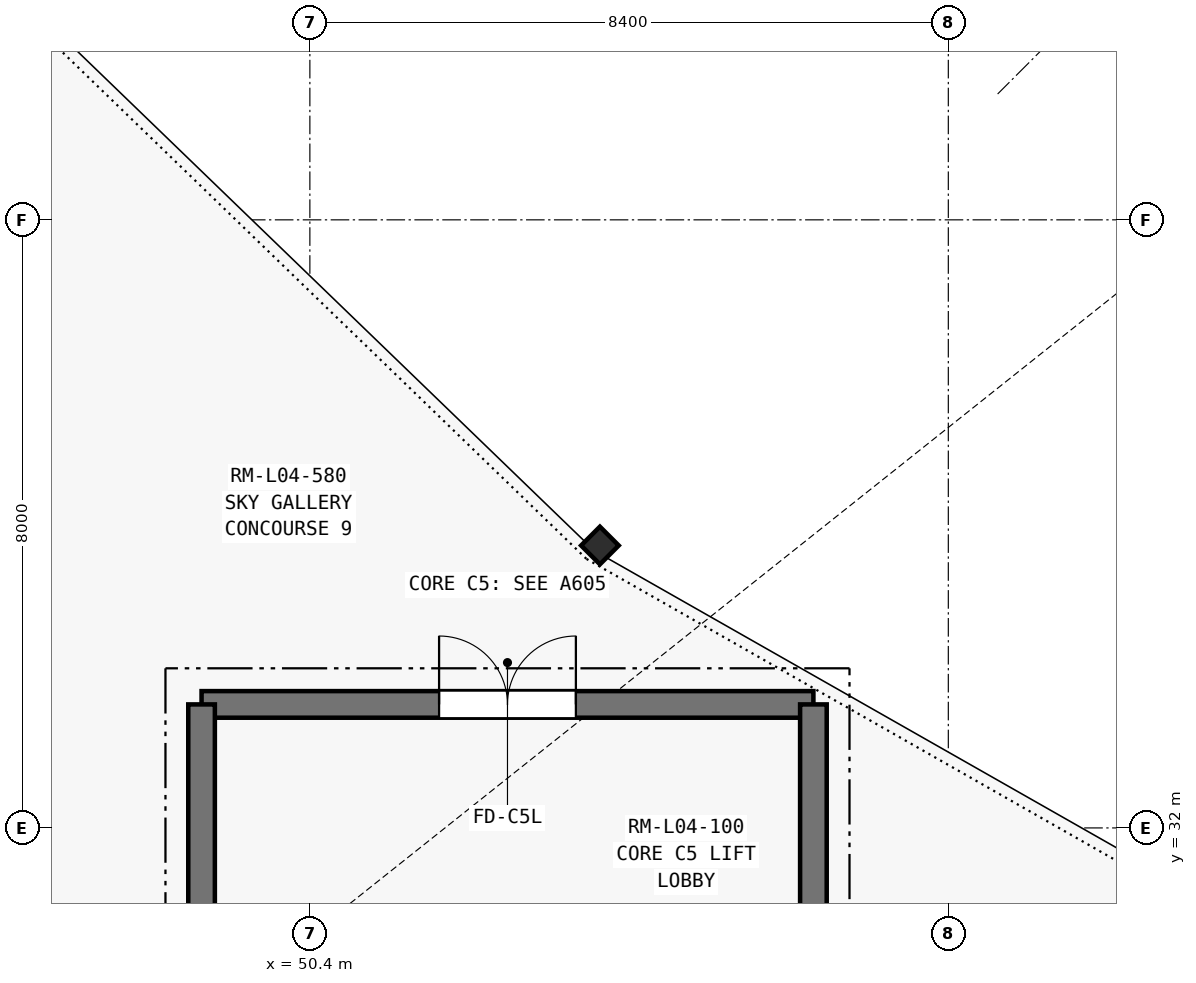
"""IFC4 building model, lengths in metres.
Left out: names, types, materials, properties, quantities, classifications, styles, units other than length and angle.
Written with IfcOpenShell. Run it as: python <this file> out.ifc"""

import sys

from ifc_helpers import new_model, si_unit, direction, frame, frame_2d, origin, origin_2d, place, context, subcontext, project, spatial, rectangle, i_section, extrude, element, fill, save


model = new_model("IFC4")
c1 = context("Model", 3, precision=1e-05, world=origin(), true_north=direction((0.0, 1.0)))
c2 = subcontext(c1, "Body", "Model", "MODEL_VIEW")
j1 = project(units=[si_unit("LENGTHUNIT", "METRE"), si_unit("PLANEANGLEUNIT", "RADIAN")], contexts=[c1])
p1 = place(None, origin())
s1 = spatial("IfcSite", under=j1, at=p1, CompositionType="ELEMENT")
p2 = place(p1, origin())
s2 = spatial("IfcBuilding", under=s1, at=p2, CompositionType="ELEMENT")
p3 = place(p2, frame((0.0, 0.0, 18.9)))
s3 = spatial("IfcBuildingStorey", under=s2, at=p3, CompositionType="ELEMENT", Elevation=18.9)
p4 = place(p3, frame((54.216, 35.716, 0.0), z_axis=(0.0, 0.0, 1.0), x_axis=(-0.707106781187, -0.707106781187, 0.0)))
e1 = element("IfcColumn", 1, at=p4, inside=s3, PredefinedType="COLUMN", context=c2, shape_type="SweptSolid", body=[
    extrude(i_section(OverallWidth=0.35, OverallDepth=0.35, WebThickness=0.014, FlangeThickness=0.024, at=origin_2d()), origin(), (0.0, 0.0, 1.0), 4.5),
])
p5 = place(p3, frame((48.975, 33.625, 0.0), z_axis=(0.0, 0.0, 1.0), x_axis=(1.0, 0.0, 0.0)))
e2 = element("IfcWall", 2, at=p5, inside=s3, PredefinedType="SHEAR", context=c2, shape_type="SweptSolid", body=[
    extrude(rectangle(XDim=8.05, YDim=0.35, at=frame_2d((4.025, 0.0))), origin(), (0.0, 0.0, 1.0), 4.5),
])
p6 = place(p5, frame((3.125, 0.0, 0.0)))
e3 = element("IfcOpeningElement", 3, at=p6, cuts=e2, PredefinedType="OPENING", context=c2, shape_type="SweptSolid", body=[
    extrude(rectangle(XDim=1.8, YDim=2.25, at=frame_2d((0.9, 1.125))), frame((0.0, 0.185, 0.0), z_axis=(0.0, -1.0, 0.0), x_axis=(1.0, 0.0, 0.0)), (0.0, 0.0, 1.0), 0.37),
])
p7 = place(p3, frame((48.975, 18.775, 0.0), z_axis=(0.0, 0.0, 1.0), x_axis=(0.0, 1.0, 0.0)))
e4 = element("IfcWall", 4, at=p7, inside=s3, PredefinedType="SHEAR", context=c2, shape_type="SweptSolid", body=[
    extrude(rectangle(XDim=14.85, YDim=0.35, at=frame_2d((7.425, 0.0))), origin(), (0.0, 0.0, 1.0), 4.5),
])
p8 = place(p3, frame((57.025, 18.775, 0.0), z_axis=(0.0, 0.0, 1.0), x_axis=(0.0, 1.0, 0.0)))
e5 = element("IfcWall", 5, at=p8, inside=s3, PredefinedType="SHEAR", context=c2, shape_type="SweptSolid", body=[
    extrude(rectangle(XDim=14.85, YDim=0.35, at=frame_2d((7.425, 0.0))), origin(), (0.0, 0.0, 1.0), 4.5),
])
p9 = place(p8, frame((2.855, 0.0, 0.0)))
e6 = element("IfcOpeningElement", 6, at=p9, cuts=e5, PredefinedType="OPENING", context=c2, shape_type="SweptSolid", body=[
    extrude(rectangle(XDim=0.9, YDim=2.1, at=frame_2d((0.45, 1.05))), frame((0.0, 0.185, 0.0), z_axis=(0.0, -1.0, 0.0), x_axis=(1.0, 0.0, 0.0)), (0.0, 0.0, 1.0), 0.37),
])
p10 = place(p6, origin())
e7 = element("IfcDoor", 7, at=p10, inside=s3, OperationType="DOUBLE_DOOR_SINGLE_SWING", PredefinedType="DOOR", context=c2, shape_type="SweptSolid", body=[
    extrude(rectangle(XDim=1.8, YDim=2.25, at=frame_2d((0.9, 1.125))), frame((0.0, 0.025, 0.0), z_axis=(0.0, -1.0, 0.0), x_axis=(1.0, 0.0, 0.0)), (0.0, 0.0, 1.0), 0.05),
])
fill(e3, e7)
save(model, sys.argv[1])
